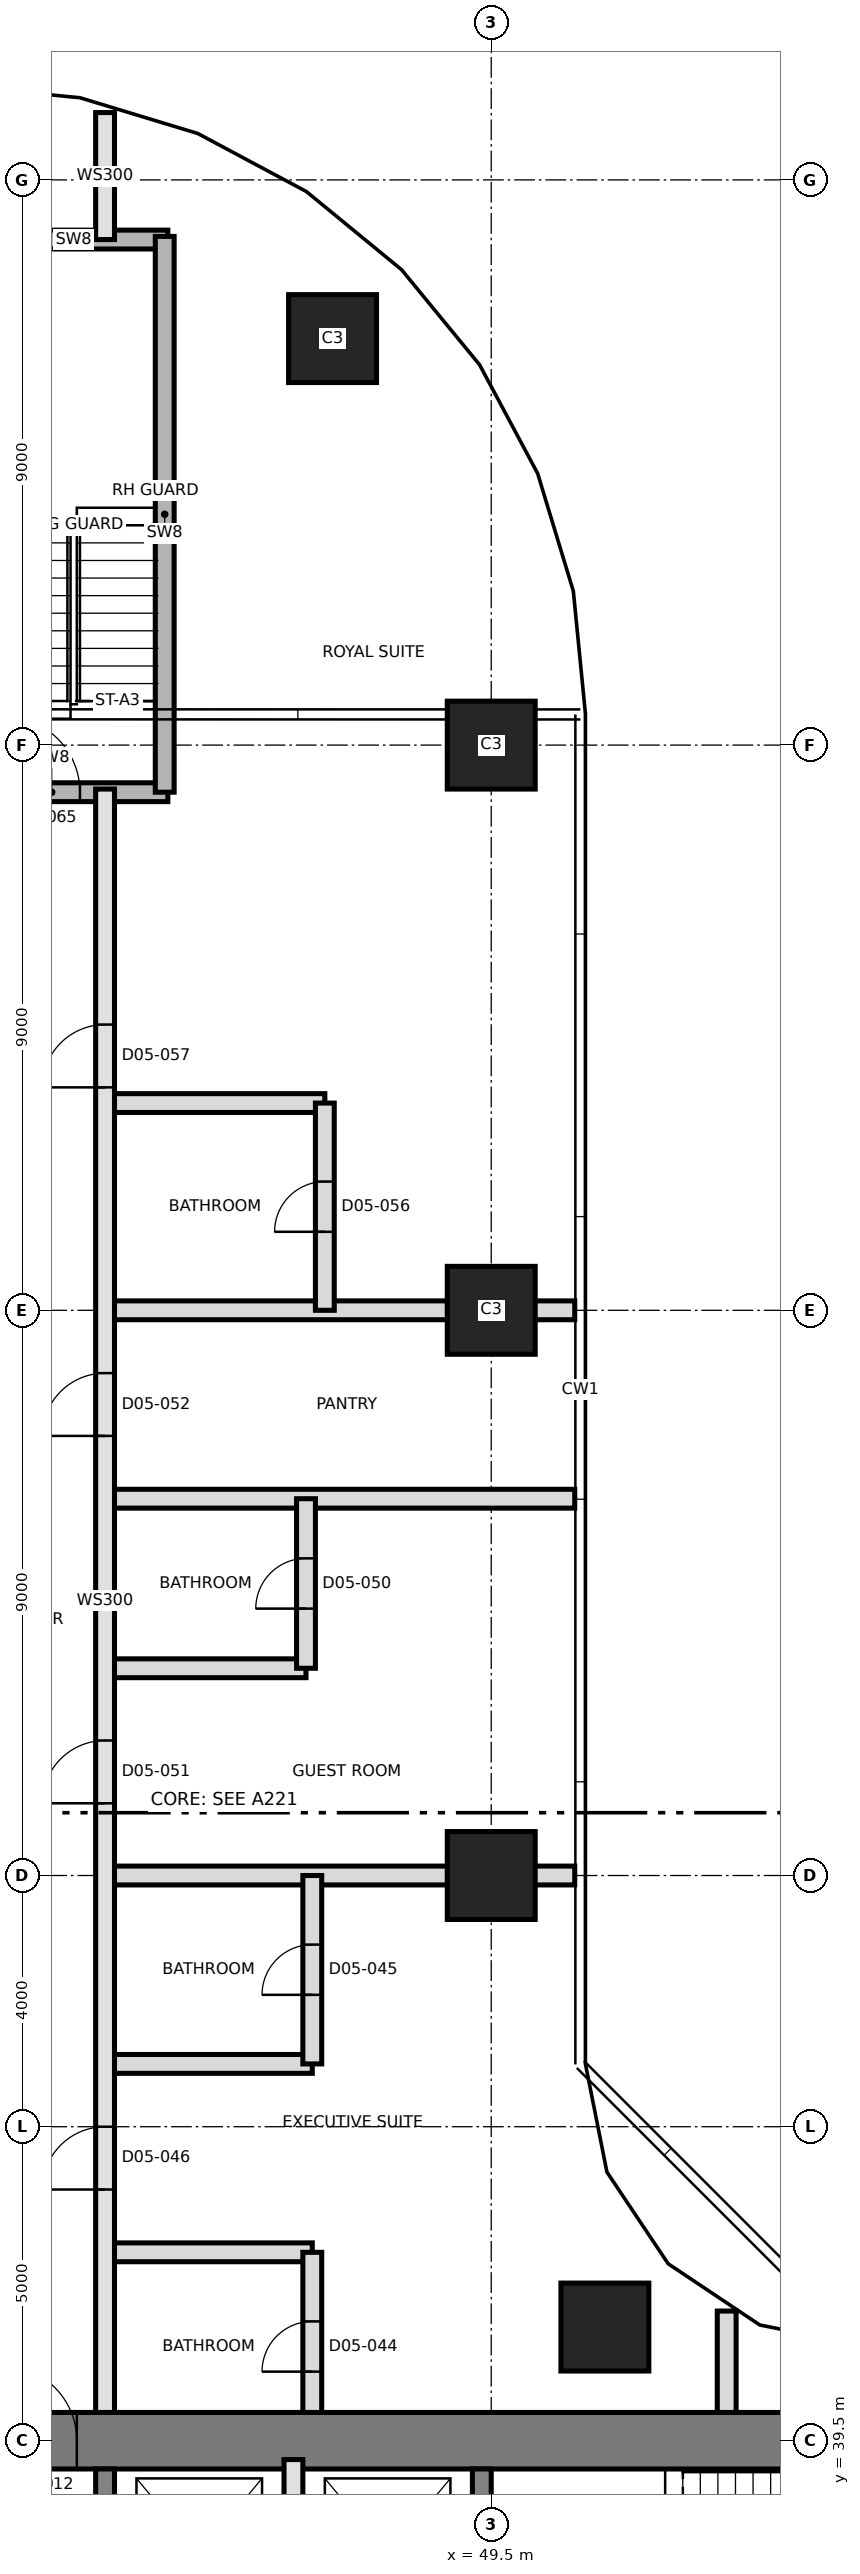
"""IFC4 building model, lengths in metres.
Left out: names, types, materials, properties, quantities, classifications, styles, units other than length and angle.
Written with IfcOpenShell. Run it as: python <this file> out.ifc"""

import sys

from ifc_helpers import new_model, si_unit, direction, frame, frame_2d, origin, origin_2d, place, context, subcontext, project, spatial, rectangle, extrude, element, fill, save


model = new_model("IFC4")
c1 = context("Model", 3, precision=1e-05, world=origin(), true_north=direction((0.0, 1.0)))
c2 = subcontext(c1, "Body", "Model", "MODEL_VIEW")
j1 = project(units=[si_unit("LENGTHUNIT", "METRE"), si_unit("PLANEANGLEUNIT", "RADIAN")], contexts=[c1])
p1 = place(None, origin())
s1 = spatial("IfcSite", under=j1, at=p1, CompositionType="ELEMENT")
p2 = place(p1, origin())
s2 = spatial("IfcBuilding", under=s1, at=p2, CompositionType="ELEMENT")
p3 = place(p2, frame((0.0, 0.0, 77.9)))
s3 = spatial("IfcBuildingStorey", under=s2, at=p3, CompositionType="ELEMENT", Elevation=77.9)
p4 = place(p3, frame((31.05, 39.5, 0.0), z_axis=(0.0, 0.0, 1.0), x_axis=(1.0, 0.0, 0.0)))
e1 = element("IfcWall", 1, at=p4, inside=s3, PredefinedType="SHEAR", context=c2, shape_type="SweptSolid", body=[
    extrude(rectangle(XDim=27.0, YDim=0.9, at=frame_2d((13.5, 0.0))), origin(), (0.0, 0.0, 1.0), 3.7),
])
p5 = place(p4, frame((10.65, 0.0, 0.0)))
e2 = element("IfcOpeningElement", 2, at=p5, cuts=e1, PredefinedType="OPENING", context=c2, shape_type="SweptSolid", body=[
    extrude(rectangle(XDim=1.2, YDim=2.1, at=frame_2d((0.6, 1.05))), frame((0.0, 0.46, 0.0), z_axis=(0.0, -1.0, 0.0), x_axis=(1.0, 0.0, 0.0)), (0.0, 0.0, 1.0), 0.92),
])
for number, where, z_axis, x_axis in (
    (3, (43.35, 33.5, 0.0), (0.0, 0.0, 1.0), (0.0, 1.0, 0.0)),
    (4, (49.35, 33.5, 0.0), (0.0, 0.0, 1.0), (0.0, 1.0, 0.0)),
):
    element("IfcWall", number, at=place(p3, frame(where, z_axis=z_axis, x_axis=x_axis)), inside=s3, PredefinedType="SHEAR", context=c2, shape_type="SweptSolid", body=[
        extrude(rectangle(XDim=5.55, YDim=0.3, at=frame_2d((2.775, 0.0))), origin(), (0.0, 0.0, 1.0), 3.7),
    ])
for number, where, z_axis, x_axis in (
    (5, (51.31, 41.31, 0.0), (0.0, 0.0, 1.0), (1.0, 0.0, 0.0)),
    (6, (49.5, 48.5, 0.0), (0.0, 0.0, 1.0), (1.0, 0.0, 0.0)),
    (7, (49.5, 57.5, 0.0), (0.0, 0.0, 1.0), (1.0, 0.0, 0.0)),
    (8, (49.5, 66.5, 0.0), (0.0, 0.0, 1.0), (1.0, 0.0, 0.0)),
    (9, (46.973, 72.973, 0.0), (0.0, 0.0, 1.0), (1.0, 0.0, 0.0)),
):
    element("IfcColumn", number, at=place(p3, frame(where, z_axis=z_axis, x_axis=x_axis)), inside=s3, PredefinedType="COLUMN", context=c2, shape_type="SweptSolid", body=[
        extrude(rectangle(XDim=1.4, YDim=1.4, at=origin_2d()), origin(), (0.0, 0.0, 1.0), 3.7),
    ])
p6 = place(p3, frame((46.35, 36.2, 0.0), z_axis=(0.0, 0.0, 1.0), x_axis=(0.0, 1.0, 0.0)))
e10 = element("IfcWall", 10, at=p6, inside=s3, PredefinedType="SOLIDWALL", context=c2, shape_type="SweptSolid", body=[
    extrude(rectangle(XDim=3.0, YDim=0.3, at=frame_2d((1.5, 0.0))), origin(), (0.0, 0.0, 1.0), 3.4),
])
for number, where, z_axis, x_axis in (
    (11, (43.35, 42.5, 0.0), (0.0, 0.0, 1.0), (1.0, 0.0, 0.0)),
    (12, (43.35, 45.5, 0.0), (0.0, 0.0, 1.0), (1.0, 0.0, 0.0)),
):
    element("IfcWall", number, at=place(p3, frame(where, z_axis=z_axis, x_axis=x_axis)), inside=s3, PredefinedType="PARTITIONING", context=c2, shape_type="SweptSolid", body=[
        extrude(rectangle(XDim=3.3, YDim=0.3, at=frame_2d((1.65, 0.0))), origin(), (0.0, 0.0, 1.0), 3.4),
    ])
p7 = place(p3, frame((43.35, 48.5, 0.0), z_axis=(0.0, 0.0, 1.0), x_axis=(1.0, 0.0, 0.0)))
e13 = element("IfcWall", 13, at=p7, inside=s3, PredefinedType="PARTITIONING", context=c2, shape_type="SweptSolid", body=[
    extrude(rectangle(XDim=7.48, YDim=0.3, at=frame_2d((3.74, 0.0))), origin(), (0.0, 0.0, 1.0), 3.4),
])
p8 = place(p3, frame((43.35, 51.8, 0.0), z_axis=(0.0, 0.0, 1.0), x_axis=(1.0, 0.0, 0.0)))
e14 = element("IfcWall", 14, at=p8, inside=s3, PredefinedType="PARTITIONING", context=c2, shape_type="SweptSolid", body=[
    extrude(rectangle(XDim=3.2, YDim=0.3, at=frame_2d((1.6, 0.0))), origin(), (0.0, 0.0, 1.0), 3.4),
])
for number, where, z_axis, x_axis in (
    (15, (43.35, 54.5, 0.0), (0.0, 0.0, 1.0), (1.0, 0.0, 0.0)),
    (16, (43.35, 57.5, 0.0), (0.0, 0.0, 1.0), (1.0, 0.0, 0.0)),
):
    element("IfcWall", number, at=place(p3, frame(where, z_axis=z_axis, x_axis=x_axis)), inside=s3, PredefinedType="PARTITIONING", context=c2, shape_type="SweptSolid", body=[
        extrude(rectangle(XDim=7.48, YDim=0.3, at=frame_2d((3.74, 0.0))), origin(), (0.0, 0.0, 1.0), 3.4),
    ])
p9 = place(p3, frame((43.35, 60.8, 0.0), z_axis=(0.0, 0.0, 1.0), x_axis=(1.0, 0.0, 0.0)))
e17 = element("IfcWall", 17, at=p9, inside=s3, PredefinedType="PARTITIONING", context=c2, shape_type="SweptSolid", body=[
    extrude(rectangle(XDim=3.5, YDim=0.3, at=frame_2d((1.75, 0.0))), origin(), (0.0, 0.0, 1.0), 3.4),
])
p10 = place(p3, frame((40.65, 65.75, 0.0), z_axis=(0.0, 0.0, 1.0), x_axis=(1.0, 0.0, 0.0)))
e18 = element("IfcWall", 18, at=p10, inside=s3, PredefinedType="SHEAR", context=c2, shape_type="SweptSolid", body=[
    extrude(rectangle(XDim=3.7, YDim=0.3, at=frame_2d((1.85, 0.0))), origin(), (0.0, 0.0, 1.0), 3.4),
])
p11 = place(p10, frame((1.1, 0.0, 0.0)))
e19 = element("IfcOpeningElement", 19, at=p11, cuts=e18, PredefinedType="OPENING", context=c2, shape_type="SweptSolid", body=[
    extrude(rectangle(XDim=1.2, YDim=2.1, at=frame_2d((0.6, 1.05))), frame((0.0, 0.16, 0.0), z_axis=(0.0, -1.0, 0.0), x_axis=(1.0, 0.0, 0.0)), (0.0, 0.0, 1.0), 0.32),
])
p12 = place(p3, frame((41.35, 74.55, 0.0), z_axis=(0.0, 0.0, 1.0), x_axis=(1.0, 0.0, 0.0)))
e20 = element("IfcWall", 20, at=p12, inside=s3, PredefinedType="SHEAR", context=c2, shape_type="SweptSolid", body=[
    extrude(rectangle(XDim=3.0, YDim=0.3, at=frame_2d((1.5, 0.0))), origin(), (0.0, 0.0, 1.0), 3.4),
])
p13 = place(p3, frame((43.35, 39.95, 0.0), z_axis=(0.0, 0.0, 1.0), x_axis=(0.0, 1.0, 0.0)))
e21 = element("IfcWall", 21, at=p13, inside=s3, PredefinedType="SOLIDWALL", context=c2, shape_type="SweptSolid", body=[
    extrude(rectangle(XDim=25.85, YDim=0.3, at=frame_2d((12.925, 0.0))), origin(), (0.0, 0.0, 1.0), 3.4),
])
p14 = place(p13, frame((3.55, 0.0, 0.0)))
e22 = element("IfcOpeningElement", 22, at=p14, cuts=e21, PredefinedType="OPENING", context=c2, shape_type="SweptSolid", body=[
    extrude(rectangle(XDim=1.0, YDim=2.4, at=frame_2d((0.5, 1.2))), frame((0.0, 0.16, 0.0), z_axis=(0.0, -1.0, 0.0), x_axis=(1.0, 0.0, 0.0)), (0.0, 0.0, 1.0), 0.32),
])
p15 = place(p13, frame((9.7, 0.0, 0.0)))
e23 = element("IfcOpeningElement", 23, at=p15, cuts=e21, PredefinedType="OPENING", context=c2, shape_type="SweptSolid", body=[
    extrude(rectangle(XDim=1.0, YDim=2.1, at=frame_2d((0.5, 1.05))), frame((0.0, 0.16, 0.0), z_axis=(0.0, -1.0, 0.0), x_axis=(1.0, 0.0, 0.0)), (0.0, 0.0, 1.0), 0.32),
])
p16 = place(p13, frame((15.55, 0.0, 0.0)))
e24 = element("IfcOpeningElement", 24, at=p16, cuts=e21, PredefinedType="OPENING", context=c2, shape_type="SweptSolid", body=[
    extrude(rectangle(XDim=1.0, YDim=2.1, at=frame_2d((0.5, 1.05))), frame((0.0, 0.16, 0.0), z_axis=(0.0, -1.0, 0.0), x_axis=(1.0, 0.0, 0.0)), (0.0, 0.0, 1.0), 0.32),
])
p17 = place(p13, frame((21.1, 0.0, 0.0)))
e25 = element("IfcOpeningElement", 25, at=p17, cuts=e21, PredefinedType="OPENING", context=c2, shape_type="SweptSolid", body=[
    extrude(rectangle(XDim=1.0, YDim=2.4, at=frame_2d((0.5, 1.2))), frame((0.0, 0.16, 0.0), z_axis=(0.0, -1.0, 0.0), x_axis=(1.0, 0.0, 0.0)), (0.0, 0.0, 1.0), 0.32),
])
p18 = place(p3, frame((43.35, 74.55, 0.0), z_axis=(0.0, 0.0, 1.0), x_axis=(0.0, 1.0, 0.0)))
e26 = element("IfcWall", 26, at=p18, inside=s3, PredefinedType="SOLIDWALL", context=c2, shape_type="SweptSolid", body=[
    extrude(rectangle(XDim=2.022, YDim=0.3, at=frame_2d((1.011, 0.0))), origin(), (0.0, 0.0, 1.0), 3.4),
])
p19 = place(p3, frame((44.3, 65.75, 0.0), z_axis=(0.0, 0.0, 1.0), x_axis=(0.0, 1.0, 0.0)))
e27 = element("IfcWall", 27, at=p19, inside=s3, PredefinedType="SHEAR", context=c2, shape_type="SweptSolid", body=[
    extrude(rectangle(XDim=8.85, YDim=0.3, at=frame_2d((4.425, 0.0))), origin(), (0.0, 0.0, 1.0), 3.4),
])
p20 = place(p3, frame((46.55, 51.8, 0.0), z_axis=(0.0, 0.0, 1.0), x_axis=(0.0, 1.0, 0.0)))
e28 = element("IfcWall", 28, at=p20, inside=s3, PredefinedType="PARTITIONING", context=c2, shape_type="SweptSolid", body=[
    extrude(rectangle(XDim=2.7, YDim=0.3, at=frame_2d((1.35, 0.0))), origin(), (0.0, 0.0, 1.0), 3.4),
])
p21 = place(p20, frame((0.95, 0.0, 0.0)))
e29 = element("IfcOpeningElement", 29, at=p21, cuts=e28, PredefinedType="OPENING", context=c2, shape_type="SweptSolid", body=[
    extrude(rectangle(XDim=0.8, YDim=2.1, at=frame_2d((0.4, 1.05))), frame((0.0, 0.16, 0.0), z_axis=(0.0, -1.0, 0.0), x_axis=(1.0, 0.0, 0.0)), (0.0, 0.0, 1.0), 0.32),
])
p22 = place(p3, frame((46.65, 39.95, 0.0), z_axis=(0.0, 0.0, 1.0), x_axis=(0.0, 1.0, 0.0)))
e30 = element("IfcWall", 30, at=p22, inside=s3, PredefinedType="PARTITIONING", context=c2, shape_type="SweptSolid", body=[
    extrude(rectangle(XDim=2.55, YDim=0.3, at=frame_2d((1.275, 0.0))), origin(), (0.0, 0.0, 1.0), 3.4),
])
p23 = place(p22, frame((0.65, 0.0, 0.0)))
e31 = element("IfcOpeningElement", 31, at=p23, cuts=e30, PredefinedType="OPENING", context=c2, shape_type="SweptSolid", body=[
    extrude(rectangle(XDim=0.8, YDim=2.1, at=frame_2d((0.4, 1.05))), frame((0.0, 0.16, 0.0), z_axis=(0.0, -1.0, 0.0), x_axis=(1.0, 0.0, 0.0)), (0.0, 0.0, 1.0), 0.32),
])
p24 = place(p3, frame((46.65, 45.5, 0.0), z_axis=(0.0, 0.0, 1.0), x_axis=(0.0, 1.0, 0.0)))
e32 = element("IfcWall", 32, at=p24, inside=s3, PredefinedType="PARTITIONING", context=c2, shape_type="SweptSolid", body=[
    extrude(rectangle(XDim=3.0, YDim=0.3, at=frame_2d((1.5, 0.0))), origin(), (0.0, 0.0, 1.0), 3.4),
])
p25 = place(p24, frame((1.1, 0.0, 0.0)))
e33 = element("IfcOpeningElement", 33, at=p25, cuts=e32, PredefinedType="OPENING", context=c2, shape_type="SweptSolid", body=[
    extrude(rectangle(XDim=0.8, YDim=2.1, at=frame_2d((0.4, 1.05))), frame((0.0, 0.16, 0.0), z_axis=(0.0, -1.0, 0.0), x_axis=(1.0, 0.0, 0.0)), (0.0, 0.0, 1.0), 0.32),
])
p26 = place(p3, frame((46.85, 57.5, 0.0), z_axis=(0.0, 0.0, 1.0), x_axis=(0.0, 1.0, 0.0)))
e34 = element("IfcWall", 34, at=p26, inside=s3, PredefinedType="PARTITIONING", context=c2, shape_type="SweptSolid", body=[
    extrude(rectangle(XDim=3.3, YDim=0.3, at=frame_2d((1.65, 0.0))), origin(), (0.0, 0.0, 1.0), 3.4),
])
p27 = place(p26, frame((1.25, 0.0, 0.0)))
e35 = element("IfcOpeningElement", 35, at=p27, cuts=e34, PredefinedType="OPENING", context=c2, shape_type="SweptSolid", body=[
    extrude(rectangle(XDim=0.8, YDim=2.1, at=frame_2d((0.4, 1.05))), frame((0.0, 0.16, 0.0), z_axis=(0.0, -1.0, 0.0), x_axis=(1.0, 0.0, 0.0)), (0.0, 0.0, 1.0), 0.32),
])
p28 = place(p3, frame((53.25, 39.95, 0.0), z_axis=(0.0, 0.0, 1.0), x_axis=(0.0, 1.0, 0.0)))
e36 = element("IfcWall", 36, at=p28, inside=s3, PredefinedType="PARTITIONING", context=c2, shape_type="SweptSolid", body=[
    extrude(rectangle(XDim=1.615, YDim=0.3, at=frame_2d((0.808, 0.0))), origin(), (0.0, 0.0, 1.0), 3.4),
])
p29 = place(p5, origin())
e37 = element("IfcDoor", 37, at=p29, inside=s3, OperationType="SINGLE_SWING_RIGHT", PredefinedType="DOOR", context=c2, shape_type="SweptSolid", body=[
    extrude(rectangle(XDim=1.2, YDim=2.1, at=frame_2d((0.6, 1.05))), frame((0.0, 0.025, 0.0), z_axis=(0.0, -1.0, 0.0), x_axis=(1.0, 0.0, 0.0)), (0.0, 0.0, 1.0), 0.05),
])
fill(e2, e37)
p30 = place(p23, origin())
e38 = element("IfcDoor", 38, at=p30, inside=s3, OperationType="SINGLE_SWING_LEFT", PredefinedType="DOOR", context=c2, shape_type="SweptSolid", body=[
    extrude(rectangle(XDim=0.8, YDim=2.1, at=frame_2d((0.4, 1.05))), frame((0.0, 0.025, 0.0), z_axis=(0.0, -1.0, 0.0), x_axis=(1.0, 0.0, 0.0)), (0.0, 0.0, 1.0), 0.05),
])
fill(e31, e38)
p31 = place(p25, origin())
e39 = element("IfcDoor", 39, at=p31, inside=s3, OperationType="SINGLE_SWING_RIGHT", PredefinedType="DOOR", context=c2, shape_type="SweptSolid", body=[
    extrude(rectangle(XDim=0.8, YDim=2.1, at=frame_2d((0.4, 1.05))), frame((0.0, 0.025, 0.0), z_axis=(0.0, -1.0, 0.0), x_axis=(1.0, 0.0, 0.0)), (0.0, 0.0, 1.0), 0.05),
])
fill(e33, e39)
p32 = place(p14, origin())
e40 = element("IfcDoor", 40, at=p32, inside=s3, OperationType="SINGLE_SWING_LEFT", PredefinedType="DOOR", context=c2, shape_type="SweptSolid", body=[
    extrude(rectangle(XDim=1.0, YDim=2.4, at=frame_2d((0.5, 1.2))), frame((0.0, 0.025, 0.0), z_axis=(0.0, -1.0, 0.0), x_axis=(1.0, 0.0, 0.0)), (0.0, 0.0, 1.0), 0.05),
])
fill(e22, e40)
p33 = place(p21, origin())
e41 = element("IfcDoor", 41, at=p33, inside=s3, OperationType="SINGLE_SWING_LEFT", PredefinedType="DOOR", context=c2, shape_type="SweptSolid", body=[
    extrude(rectangle(XDim=0.8, YDim=2.1, at=frame_2d((0.4, 1.05))), frame((0.0, 0.025, 0.0), z_axis=(0.0, -1.0, 0.0), x_axis=(1.0, 0.0, 0.0)), (0.0, 0.0, 1.0), 0.05),
])
fill(e29, e41)
p34 = place(p15, origin())
e42 = element("IfcDoor", 42, at=p34, inside=s3, OperationType="SINGLE_SWING_LEFT", PredefinedType="DOOR", context=c2, shape_type="SweptSolid", body=[
    extrude(rectangle(XDim=1.0, YDim=2.1, at=frame_2d((0.5, 1.05))), frame((0.0, 0.025, 0.0), z_axis=(0.0, -1.0, 0.0), x_axis=(1.0, 0.0, 0.0)), (0.0, 0.0, 1.0), 0.05),
])
fill(e23, e42)
p35 = place(p16, origin())
e43 = element("IfcDoor", 43, at=p35, inside=s3, OperationType="SINGLE_SWING_RIGHT", PredefinedType="DOOR", context=c2, shape_type="SweptSolid", body=[
    extrude(rectangle(XDim=1.0, YDim=2.1, at=frame_2d((0.5, 1.05))), frame((0.0, 0.025, 0.0), z_axis=(0.0, -1.0, 0.0), x_axis=(1.0, 0.0, 0.0)), (0.0, 0.0, 1.0), 0.05),
])
fill(e24, e43)
p36 = place(p27, origin())
e44 = element("IfcDoor", 44, at=p36, inside=s3, OperationType="SINGLE_SWING_LEFT", PredefinedType="DOOR", context=c2, shape_type="SweptSolid", body=[
    extrude(rectangle(XDim=0.8, YDim=2.1, at=frame_2d((0.4, 1.05))), frame((0.0, 0.025, 0.0), z_axis=(0.0, -1.0, 0.0), x_axis=(1.0, 0.0, 0.0)), (0.0, 0.0, 1.0), 0.05),
])
fill(e35, e44)
p37 = place(p17, origin())
e45 = element("IfcDoor", 45, at=p37, inside=s3, OperationType="SINGLE_SWING_LEFT", PredefinedType="DOOR", context=c2, shape_type="SweptSolid", body=[
    extrude(rectangle(XDim=1.0, YDim=2.4, at=frame_2d((0.5, 1.2))), frame((0.0, 0.025, 0.0), z_axis=(0.0, -1.0, 0.0), x_axis=(1.0, 0.0, 0.0)), (0.0, 0.0, 1.0), 0.05),
])
fill(e25, e45)
p38 = place(p11, origin())
e46 = element("IfcDoor", 46, at=p38, inside=s3, OperationType="SINGLE_SWING_RIGHT", PredefinedType="DOOR", context=c2, shape_type="SweptSolid", body=[
    extrude(rectangle(XDim=1.2, YDim=2.1, at=frame_2d((0.6, 1.05))), frame((0.0, 0.025, 0.0), z_axis=(0.0, -1.0, 0.0), x_axis=(1.0, 0.0, 0.0)), (0.0, 0.0, 1.0), 0.05),
])
fill(e19, e46)
save(model, sys.argv[1])
